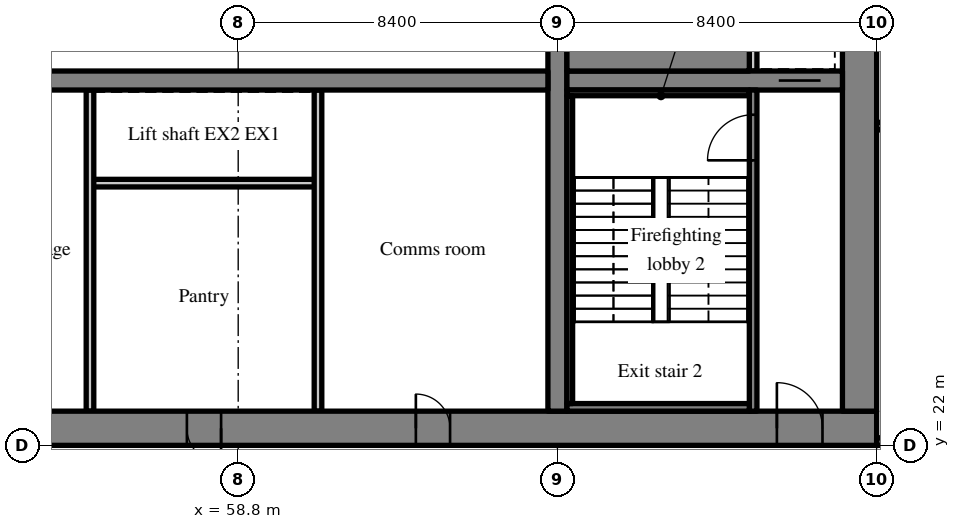
"""IFC4 building model, lengths in metres.
Left out: names, types, materials, properties, quantities, classifications, styles, units other than length and angle.
Written with IfcOpenShell. Run it as: python <this file> out.ifc"""

import sys

from ifc_helpers import new_model, si_unit, direction, frame, frame_2d, origin, place, context, subcontext, project, spatial, rectangle, extrude, source, transform, mapped, element, fill, save


model = new_model("IFC4")
c1 = context("Model", 3, precision=1e-05, world=origin(), true_north=direction((0.0, 1.0)))
c2 = subcontext(c1, "Body", "Model", "MODEL_VIEW")
j1 = project(units=[si_unit("LENGTHUNIT", "METRE"), si_unit("PLANEANGLEUNIT", "RADIAN")], contexts=[c1])
p1 = place(None, origin())
s1 = spatial("IfcSite", under=j1, at=p1, CompositionType="ELEMENT")
p2 = place(p1, origin())
s2 = spatial("IfcBuilding", under=s1, at=p2, CompositionType="ELEMENT")
p3 = place(p2, frame((0.0, 0.0, 102.8)))
s3 = spatial("IfcBuildingStorey", under=s2, at=p3, CompositionType="ELEMENT", Elevation=102.8)
m1 = source(origin(), c2, "Body", "SweptSolid", [
    extrude(rectangle(XDim=50.4, YDim=0.9, at=frame_2d((25.2, 0.0))), origin(), (0.0, 0.0, 1.0), 3.52),
])
p4 = place(p3, frame((25.2, 22.45, 0.0), z_axis=(0.0, 0.0, 1.0), x_axis=(1.0, 0.0, 0.0)))
e1 = element("IfcWall", 1, at=p4, inside=s3, PredefinedType="SHEAR", context=c2, shape_type="MappedRepresentation", body=[
    mapped(m1, transform((0.0, 0.0, 0.0), scale=1.0)),
])
m2 = source(origin(), c2, "Body", "SweptSolid", [
    extrude(rectangle(XDim=1.8, YDim=2.1, at=frame_2d((0.9, 1.05))), frame((0.0, 0.46, 0.0), z_axis=(0.0, -1.0, 0.0), x_axis=(1.0, 0.0, 0.0)), (0.0, 0.0, 1.0), 0.92),
])
p5 = place(p4, frame((15.9, 0.0, 0.0)))
e2 = element("IfcOpeningElement", 2, at=p5, cuts=e1, PredefinedType="OPENING", context=c2, shape_type="MappedRepresentation", body=[
    mapped(m2, transform((0.0, 0.0, 0.0), scale=1.0)),
])
m3 = source(origin(), c2, "Body", "SweptSolid", [
    extrude(rectangle(XDim=1.2, YDim=2.1, at=frame_2d((0.6, 1.05))), frame((0.0, 0.46, 0.0), z_axis=(0.0, -1.0, 0.0), x_axis=(1.0, 0.0, 0.0)), (0.0, 0.0, 1.0), 0.92),
])
p6 = place(p4, frame((26.975, 0.0, 0.0)))
e3 = element("IfcOpeningElement", 3, at=p6, cuts=e1, PredefinedType="OPENING", context=c2, shape_type="MappedRepresentation", body=[
    mapped(m3, transform((0.0, 0.0, 0.0), scale=1.0)),
])
m4 = source(origin(), c2, "Body", "SweptSolid", [
    extrude(rectangle(XDim=0.9, YDim=2.1, at=frame_2d((0.45, 1.05))), frame((0.0, 0.46, 0.0), z_axis=(0.0, -1.0, 0.0), x_axis=(1.0, 0.0, 0.0)), (0.0, 0.0, 1.0), 0.92),
])
p7 = place(p4, frame((32.25, 0.0, 0.0)))
e4 = element("IfcOpeningElement", 4, at=p7, cuts=e1, PredefinedType="OPENING", context=c2, shape_type="MappedRepresentation", body=[
    mapped(m4, transform((0.0, 0.0, 0.0), scale=1.0)),
])
p8 = place(p4, frame((38.275, 0.0, 0.0)))
e5 = element("IfcOpeningElement", 5, at=p8, cuts=e1, PredefinedType="OPENING", context=c2, shape_type="MappedRepresentation", body=[
    mapped(m4, transform((0.0, 0.0, 0.0), scale=1.0)),
])
p9 = place(p4, frame((6.45, 0.0, 0.0)))
e6 = element("IfcOpeningElement", 6, at=p9, cuts=e1, PredefinedType="OPENING", context=c2, shape_type="MappedRepresentation", body=[
    mapped(m3, transform((0.0, 0.0, 0.0), scale=1.0)),
])
p10 = place(p4, frame((47.775, 0.0, 0.0)))
e7 = element("IfcOpeningElement", 7, at=p10, cuts=e1, PredefinedType="OPENING", context=c2, shape_type="MappedRepresentation", body=[
    mapped(m3, transform((0.0, 0.0, 0.0), scale=1.0)),
])
m5 = source(origin(), c2, "Body", "SweptSolid", [
    extrude(rectangle(XDim=18.2, YDim=0.9, at=frame_2d((9.1, 0.0))), origin(), (0.0, 0.0, 1.0), 3.52),
])
p11 = place(p3, frame((75.15, 22.9, 0.0), z_axis=(0.0, 0.0, 1.0), x_axis=(0.0, 1.0, 0.0)))
e8 = element("IfcWall", 8, at=p11, inside=s3, PredefinedType="SHEAR", context=c2, shape_type="MappedRepresentation", body=[
    mapped(m5, transform((0.0, 0.0, 0.0), scale=1.0)),
])
p12 = place(p11, frame((12.5, 0.0, 0.0)))
e9 = element("IfcOpeningElement", 9, at=p12, cuts=e8, PredefinedType="OPENING", context=c2, shape_type="MappedRepresentation", body=[
    mapped(m3, transform((0.0, 0.0, 0.0), scale=1.0)),
])
m6 = source(origin(), c2, "Body", "SweptSolid", [
    extrude(rectangle(XDim=18.2, YDim=0.5, at=frame_2d((9.1, 0.0))), origin(), (0.0, 0.0, 1.0), 3.52),
])
p13 = place(p3, frame((67.2, 22.9, 0.0), z_axis=(0.0, 0.0, 1.0), x_axis=(0.0, 1.0, 0.0)))
e10 = element("IfcWall", 10, at=p13, inside=s3, PredefinedType="SHEAR", context=c2, shape_type="MappedRepresentation", body=[
    mapped(m6, transform((0.0, 0.0, 0.0), scale=1.0)),
])
m7 = source(origin(), c2, "Body", "SweptSolid", [
    extrude(rectangle(XDim=16.3, YDim=0.5, at=frame_2d((8.15, 0.0))), origin(), (0.0, 0.0, 1.0), 3.52),
])
p14 = place(p3, frame((50.65, 31.6, 0.0), z_axis=(0.0, 0.0, 1.0), x_axis=(1.0, 0.0, 0.0)))
e11 = element("IfcWall", 11, at=p14, inside=s3, PredefinedType="SHEAR", context=c2, shape_type="MappedRepresentation", body=[
    mapped(m7, transform((0.0, 0.0, 0.0), scale=1.0)),
])
m8 = source(origin(), c2, "Body", "SweptSolid", [
    extrude(rectangle(XDim=1.0, YDim=2.1, at=frame_2d((0.5, 1.05))), frame((0.0, 0.26, 0.0), z_axis=(0.0, -1.0, 0.0), x_axis=(1.0, 0.0, 0.0)), (0.0, 0.0, 1.0), 0.52),
])
p15 = place(p14, frame((0.575, 0.0, 0.0)))
e12 = element("IfcOpeningElement", 12, at=p15, cuts=e11, PredefinedType="OPENING", context=c2, shape_type="MappedRepresentation", body=[
    mapped(m8, transform((0.0, 0.0, 0.0), scale=1.0)),
])
m9 = source(origin(), c2, "Body", "SweptSolid", [
    extrude(rectangle(XDim=7.25, YDim=0.5, at=frame_2d((3.625, 0.0))), origin(), (0.0, 0.0, 1.0), 3.52),
])
p16 = place(p3, frame((67.45, 31.6, 0.0), z_axis=(0.0, 0.0, 1.0), x_axis=(1.0, 0.0, 0.0)))
e13 = element("IfcWall", 13, at=p16, inside=s3, PredefinedType="SHEAR", context=c2, shape_type="MappedRepresentation", body=[
    mapped(m9, transform((0.0, 0.0, 0.0), scale=1.0)),
])
m10 = source(origin(), c2, "Body", "SweptSolid", [
    extrude(rectangle(XDim=1.1, YDim=2.1, at=frame_2d((0.55, 1.05))), frame((0.0, 0.26, 0.0), z_axis=(0.0, -1.0, 0.0), x_axis=(1.0, 0.0, 0.0)), (0.0, 0.0, 1.0), 0.52),
])
p17 = place(p16, frame((5.575, 0.0, 0.0)))
e14 = element("IfcOpeningElement", 14, at=p17, cuts=e13, PredefinedType="OPENING", context=c2, shape_type="MappedRepresentation", body=[
    mapped(m10, transform((0.0, 0.0, 0.0), scale=1.0)),
])
m11 = source(origin(), c2, "Body", "SweptSolid", [
    extrude(rectangle(XDim=6.0, YDim=0.2, at=frame_2d((3.0, 0.0))), origin(), (0.0, 0.0, 1.0), 3.52),
])
p18 = place(p3, frame((60.9, 28.9, 0.0), z_axis=(0.0, 0.0, 1.0), x_axis=(-1.0, 0.0, 0.0)))
e15 = element("IfcWall", 15, at=p18, inside=s3, PredefinedType="SOLIDWALL", context=c2, shape_type="MappedRepresentation", body=[
    mapped(m11, transform((0.0, 0.0, 0.0), scale=1.0)),
])
m12 = source(origin(), c2, "Body", "SweptSolid", [
    extrude(rectangle(XDim=8.45, YDim=0.2, at=frame_2d((4.225, 0.0))), origin(), (0.0, 0.0, 1.0), 3.52),
])
for number, where, z_axis, x_axis in (
    (16, (54.9, 22.9, 0.0), (0.0, 0.0, 1.0), (0.0, 1.0, 0.0)),
    (17, (60.9, 22.9, 0.0), (0.0, 0.0, 1.0), (0.0, 1.0, 0.0)),
):
    element("IfcWall", number, at=place(p3, frame(where, z_axis=z_axis, x_axis=x_axis)), inside=s3, PredefinedType="PARTITIONING", context=c2, shape_type="MappedRepresentation", body=[
        mapped(m12, transform((0.0, 0.0, 0.0), scale=1.0)),
    ])
m13 = source(origin(), c2, "Body", "SweptSolid", [
    extrude(rectangle(XDim=8.45, YDim=0.2, at=frame_2d((4.225, 0.0))), origin(), (0.0, 0.0, 1.0), 3.52),
])
p19 = place(p3, frame((72.35, 22.9, 0.0), z_axis=(0.0, 0.0, 1.0), x_axis=(0.0, 1.0, 0.0)))
e18 = element("IfcWall", 18, at=p19, inside=s3, PredefinedType="SOLIDWALL", context=c2, shape_type="MappedRepresentation", body=[
    mapped(m13, transform((0.0, 0.0, 0.0), scale=1.0)),
])
m14 = source(origin(), c2, "Body", "SweptSolid", [
    extrude(rectangle(XDim=1.2, YDim=2.1, at=frame_2d((0.6, 1.05))), frame((0.0, 0.11, 0.0), z_axis=(0.0, -1.0, 0.0), x_axis=(1.0, 0.0, 0.0)), (0.0, 0.0, 1.0), 0.22),
])
p20 = place(p19, frame((6.6, 0.0, 0.0)))
e19 = element("IfcOpeningElement", 19, at=p20, cuts=e18, PredefinedType="OPENING", context=c2, shape_type="MappedRepresentation", body=[
    mapped(m14, transform((0.0, 0.0, 0.0), scale=1.0)),
])
m15 = source(origin(), c2, "Body", "SweptSolid", [
    extrude(rectangle(XDim=1.75, YDim=0.2, at=frame_2d((0.875, 0.0))), origin(), (0.0, 0.0, 1.0), 3.52),
])
p21 = place(p3, frame((72.35, 31.85, 0.0), z_axis=(0.0, 0.0, 1.0), x_axis=(0.0, 1.0, 0.0)))
e20 = element("IfcWall", 20, at=p21, inside=s3, PredefinedType="SOLIDWALL", context=c2, shape_type="MappedRepresentation", body=[
    mapped(m15, transform((0.0, 0.0, 0.0), scale=1.0)),
])
m16 = source(origin(), c2, "Body", "SweptSolid", [
    extrude(rectangle(XDim=8.225, YDim=0.2, at=frame_2d((4.112, 0.0))), origin(), (0.0, 0.0, 1.0), 3.52),
])
p22 = place(p3, frame((83.825, 22.1, 0.0), z_axis=(0.0, 0.0, 1.0), x_axis=(-1.0, 0.0, 0.0)))
e21 = element("IfcWall", 21, at=p22, inside=s3, PredefinedType="SOLIDWALL", context=c2, shape_type="MappedRepresentation", body=[
    mapped(m16, transform((0.0, 0.0, 0.0), scale=1.0)),
])
p23 = place(p22, frame((6.025, 0.0, 0.0)))
e22 = element("IfcOpeningElement", 22, at=p23, cuts=e21, PredefinedType="OPENING", context=c2, shape_type="MappedRepresentation", body=[
    mapped(m14, transform((0.0, 0.0, 0.0), scale=1.0)),
])
p24 = place(p3, frame((83.825, 30.4, 0.0), z_axis=(0.0, 0.0, 1.0), x_axis=(-1.0, 0.0, 0.0)))
e23 = element("IfcWall", 23, at=p24, inside=s3, PredefinedType="SOLIDWALL", context=c2, shape_type="MappedRepresentation", body=[
    mapped(m16, transform((0.0, 0.0, 0.0), scale=1.0)),
])
m17 = source(origin(), c2, "Body", "SweptSolid", [
    extrude(rectangle(XDim=1.0, YDim=2.1, at=frame_2d((0.5, 1.05))), frame((0.0, 0.11, 0.0), z_axis=(0.0, -1.0, 0.0), x_axis=(1.0, 0.0, 0.0)), (0.0, 0.0, 1.0), 0.22),
])
p25 = place(p24, frame((6.125, 0.0, 0.0)))
e24 = element("IfcOpeningElement", 24, at=p25, cuts=e23, PredefinedType="OPENING", context=c2, shape_type="MappedRepresentation", body=[
    mapped(m17, transform((0.0, 0.0, 0.0), scale=1.0)),
])
m18 = source(origin(), c2, "Body", "SweptSolid", [
    extrude(rectangle(XDim=4.8, YDim=0.2, at=frame_2d((2.4, 0.0))), origin(), (0.0, 0.0, 1.0), 3.52),
])
p26 = place(p3, frame((67.45, 23.0, 0.0), z_axis=(0.0, 0.0, 1.0), x_axis=(1.0, 0.0, 0.0)))
e25 = element("IfcWall", 25, at=p26, inside=s3, PredefinedType="SOLIDWALL", context=c2, shape_type="MappedRepresentation", body=[
    mapped(m18, transform((0.0, 0.0, 0.0), scale=1.0)),
])
m19 = source(origin(), c2, "Body", "SweptSolid", [
    extrude(rectangle(XDim=4.8, YDim=0.15, at=frame_2d((2.4, 0.0))), origin(), (0.0, 0.0, 1.0), 3.52),
])
p27 = place(p3, frame((67.45, 31.275, 0.0), z_axis=(0.0, 0.0, 1.0), x_axis=(1.0, 0.0, 0.0)))
e26 = element("IfcWall", 26, at=p27, inside=s3, PredefinedType="SOLIDWALL", context=c2, shape_type="MappedRepresentation", body=[
    mapped(m19, transform((0.0, 0.0, 0.0), scale=1.0)),
])
m20 = source(origin(), c2, "Body", "SweptSolid", [
    extrude(rectangle(XDim=8.1, YDim=0.15, at=frame_2d((4.05, 0.0))), origin(), (0.0, 0.0, 1.0), 3.52),
])
p28 = place(p3, frame((67.525, 23.1, 0.0), z_axis=(0.0, 0.0, 1.0), x_axis=(0.0, 1.0, 0.0)))
e27 = element("IfcWall", 27, at=p28, inside=s3, PredefinedType="SOLIDWALL", context=c2, shape_type="MappedRepresentation", body=[
    mapped(m20, transform((0.0, 0.0, 0.0), scale=1.0)),
])
m21 = source(origin(), c2, "Body", "SweptSolid", [
    extrude(rectangle(XDim=4.8, YDim=0.95, at=frame_2d((2.4, 0.0))), origin(), (0.0, 0.0, 1.0), 3.52),
])
p29 = place(p3, frame((67.45, 32.325, 0.0), z_axis=(0.0, 0.0, 1.0), x_axis=(1.0, 0.0, 0.0)))
e28 = element("IfcWall", 28, at=p29, inside=s3, PredefinedType="SOLIDWALL", context=c2, shape_type="MappedRepresentation", body=[
    mapped(m21, transform((0.0, 0.0, 0.0), scale=1.0)),
])
m22 = source(origin(), c2, "Body", "SweptSolid", [
    extrude(rectangle(XDim=0.9, YDim=2.1, at=frame_2d((0.45, 1.05))), frame((0.0, 0.375, 0.0), z_axis=(0.0, -1.0, 0.0), x_axis=(1.0, 0.0, 0.0)), (0.0, 0.0, 1.0), 0.05),
])
p30 = place(p7, origin())
e29 = element("IfcDoor", 29, at=p30, inside=s3, OperationType="SINGLE_SWING_RIGHT", PredefinedType="DOOR", context=c2, shape_type="MappedRepresentation", body=[
    mapped(m22, transform((0.0, 0.0, 0.0), scale=1.0)),
])
fill(e4, e29)
p31 = place(p8, origin())
e30 = element("IfcDoor", 30, at=p31, inside=s3, OperationType="SINGLE_SWING_LEFT", PredefinedType="DOOR", context=c2, shape_type="MappedRepresentation", body=[
    mapped(m22, transform((0.0, 0.0, 0.0), scale=1.0)),
])
fill(e5, e30)
m23 = source(origin(), c2, "Body", "SweptSolid", [
    extrude(rectangle(XDim=1.2, YDim=2.1, at=frame_2d((0.6, 1.05))), frame((0.0, 0.025, 0.0), z_axis=(0.0, -1.0, 0.0), x_axis=(1.0, 0.0, 0.0)), (0.0, 0.0, 1.0), 0.05),
])
p32 = place(p20, origin())
e31 = element("IfcDoor", 31, at=p32, inside=s3, OperationType="SINGLE_SWING_LEFT", PredefinedType="DOOR", context=c2, shape_type="MappedRepresentation", body=[
    mapped(m23, transform((0.0, 0.0, 0.0), scale=1.0)),
])
fill(e19, e31)
m24 = source(origin(), c2, "Body", "SweptSolid", [
    extrude(rectangle(XDim=1.2, YDim=2.1, at=frame_2d((0.6, 1.05))), frame((0.0, 0.375, 0.0), z_axis=(0.0, -1.0, 0.0), x_axis=(1.0, 0.0, 0.0)), (0.0, 0.0, 1.0), 0.05),
])
p33 = place(p10, origin())
e32 = element("IfcDoor", 32, at=p33, inside=s3, OperationType="SINGLE_SWING_LEFT", PredefinedType="DOOR", context=c2, shape_type="MappedRepresentation", body=[
    mapped(m24, transform((0.0, 0.0, 0.0), scale=1.0)),
])
fill(e7, e32)
m25 = source(origin(), c2, "Body", "SweptSolid", [
    extrude(rectangle(XDim=1.1, YDim=2.1, at=frame_2d((0.55, 1.05))), frame((0.0, 0.025, 0.0), z_axis=(0.0, -1.0, 0.0), x_axis=(1.0, 0.0, 0.0)), (0.0, 0.0, 1.0), 0.05),
])
p34 = place(p17, origin())
e33 = element("IfcDoor", 33, at=p34, inside=s3, OperationType="SLIDING_TO_RIGHT", PredefinedType="DOOR", context=c2, shape_type="MappedRepresentation", body=[
    mapped(m25, transform((0.0, 0.0, 0.0), scale=1.0)),
])
fill(e14, e33)
save(model, sys.argv[1])
